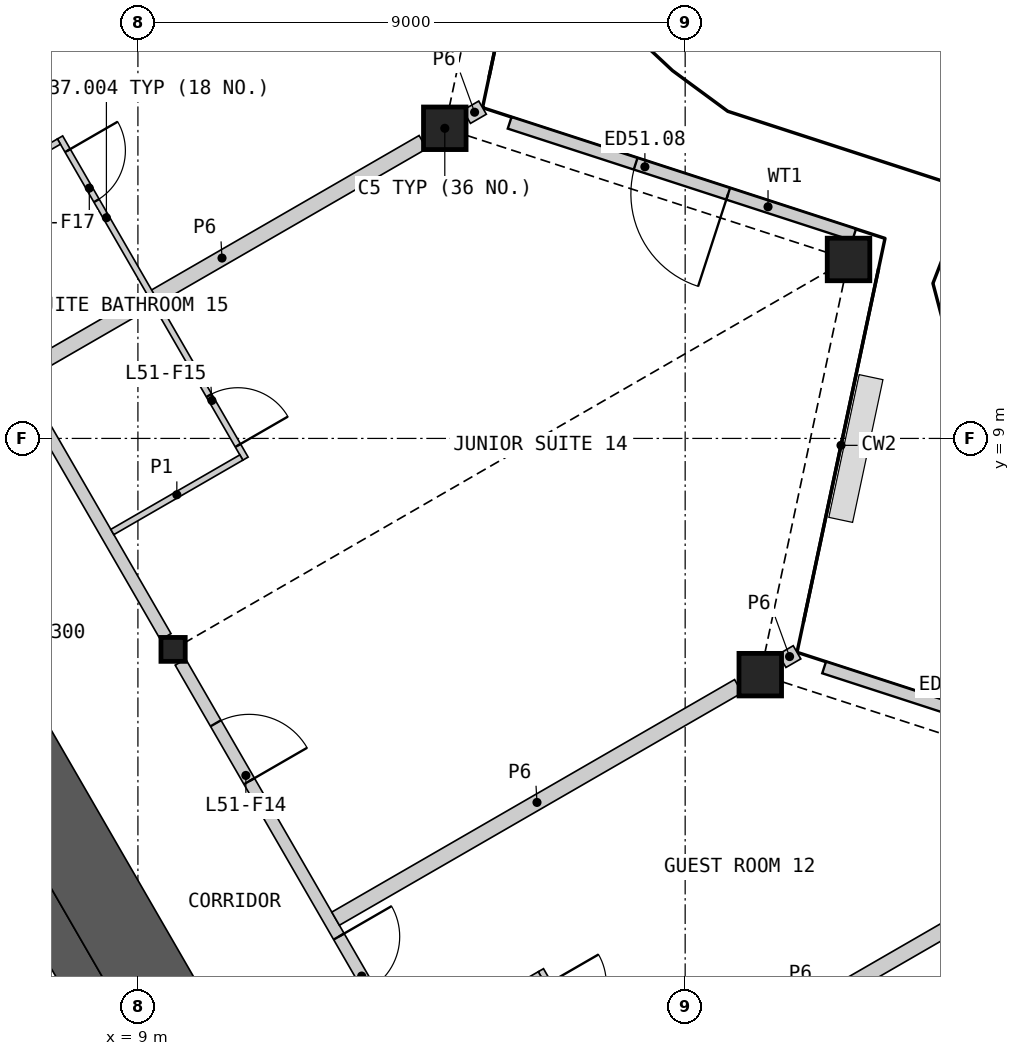
"""IFC4 building model, lengths in metres.
Left out: names, types, materials, properties, quantities, classifications, styles, units other than length and angle.
Written with IfcOpenShell. Run it as: python <this file> out.ifc"""

import sys

from ifc_helpers import new_model, si_unit, direction, frame, frame_2d, origin, origin_2d, place, context, subcontext, project, spatial, polyline, rectangle, hollow_rectangle, i_section, outline, extrude, element, fill, save


model = new_model("IFC4")
c1 = context("Model", 3, precision=1e-05, world=origin(), true_north=direction((0.0, 1.0)))
c2 = subcontext(c1, "Body", "Model", "MODEL_VIEW")
j1 = project(units=[si_unit("LENGTHUNIT", "METRE"), si_unit("PLANEANGLEUNIT", "RADIAN")], contexts=[c1])
p1 = place(None, origin())
s1 = spatial("IfcSite", under=j1, at=p1, CompositionType="ELEMENT")
p2 = place(p1, origin())
s2 = spatial("IfcBuilding", under=s1, at=p2, CompositionType="ELEMENT")
p3 = place(p2, frame((0.0, 0.0, 234.6)))
s3 = spatial("IfcBuildingStorey", under=s2, at=p3, CompositionType="ELEMENT", Elevation=234.6)
for number, where, z_axis, x_axis in (
    (1, (19.235, 5.115, 0.0), (0.0, 0.0, 1.0), (1.0, 0.0, 0.0)),
    (2, (20.687, 11.943, 0.0), (0.0, 0.0, 1.0), (1.0, 0.0, 0.0)),
    (3, (14.047, 14.101, 0.0), (0.0, 0.0, 1.0), (1.0, 0.0, 0.0)),
):
    element("IfcColumn", number, at=place(p3, frame(where, z_axis=z_axis, x_axis=x_axis)), inside=s3, PredefinedType="COLUMN", context=c2, shape_type="SweptSolid", body=[
        extrude(hollow_rectangle(XDim=0.7, YDim=0.7, WallThickness=0.045, at=origin_2d()), origin(), (0.0, 0.0, 1.0), 3.6),
    ])
p4 = place(p3, frame((9.578, 5.53, 0.0), z_axis=(0.0, 0.0, 1.0), x_axis=(1.0, 0.0, 0.0)))
e4 = element("IfcColumn", 4, at=p4, inside=s3, PredefinedType="COLUMN", context=c2, shape_type="SweptSolid", body=[
    extrude(i_section(OverallWidth=0.399, OverallDepth=0.393, WebThickness=0.023, FlangeThickness=0.037, at=origin_2d()), origin(), (0.0, 0.0, 1.0), 3.6),
])
p5 = place(p3, frame((25.977, 3.383, 0.0), z_axis=(0.0, 0.0, 1.0), x_axis=(-0.951062846307, 0.308997511922, 0.0)))
e5 = element("IfcWall", 5, at=p5, inside=s3, PredefinedType="SOLIDWALL", context=c2, shape_type="SweptSolid", body=[
    extrude(rectangle(XDim=5.984, YDim=0.2, at=frame_2d((2.992, 0.0))), origin(), (0.0, 0.0, 1.0), 2.701),
])
p6 = place(p5, frame((2.206, 0.0, 0.0)))
e6 = element("IfcOpeningElement", 6, at=p6, cuts=e5, PredefinedType="OPENING", context=c2, shape_type="SweptSolid", body=[
    extrude(rectangle(XDim=1.6, YDim=2.4, at=frame_2d((0.8, 1.2))), frame((0.0, 0.11, 0.0), z_axis=(0.0, -1.0, 0.0), x_axis=(1.0, 0.0, 0.0)), (0.0, 0.0, 1.0), 0.22),
])
p7 = place(p3, frame((20.779, 12.35, 0.0), z_axis=(0.0, 0.0, 1.0), x_axis=(-0.951065383831, 0.308989701572, 0.0)))
e7 = element("IfcWall", 7, at=p7, inside=s3, PredefinedType="SOLIDWALL", context=c2, shape_type="SweptSolid", body=[
    extrude(rectangle(XDim=5.958, YDim=0.2, at=frame_2d((2.979, 0.0))), origin(), (0.0, 0.0, 1.0), 2.701),
])
p8 = place(p7, frame((2.179, 0.0, 0.0)))
e8 = element("IfcOpeningElement", 8, at=p8, cuts=e7, PredefinedType="OPENING", context=c2, shape_type="SweptSolid", body=[
    extrude(rectangle(XDim=1.6, YDim=2.4, at=frame_2d((0.8, 1.2))), frame((0.0, 0.11, 0.0), z_axis=(0.0, -1.0, 0.0), x_axis=(1.0, 0.0, 0.0)), (0.0, 0.0, 1.0), 0.22),
])
p9 = place(p3, origin())
e9 = element("IfcWall", 9, at=p9, inside=s3, PredefinedType="SHEAR", context=c2, shape_type="SweptSolid", body=[
    extrude(outline(polyline([(6.324, 3.767), (8.624, -0.217), (8.231, -0.444), (6.061, -1.697), (5.96, -1.524), (7.952, -0.374), (5.852, 3.263), (3.861, 2.113), (3.76, 2.287), (5.931, 3.54), (6.324, 3.767)])), origin(), (0.0, 0.0, 1.0), 3.25),
])
p10 = place(p3, frame((10.081, -1.441, 0.0), z_axis=(0.0, 0.0, 1.0), x_axis=(-0.500012180433, 0.866018371294, 0.0)))
e10 = element("IfcWall", 10, at=p10, inside=s3, PredefinedType="SHEAR", context=c2, shape_type="SweptSolid", body=[
    extrude(rectangle(XDim=15.05, YDim=1.3, at=frame_2d((7.525, 0.0))), origin(), (0.0, 0.0, 1.0), 3.25),
])
p11 = place(p3, frame((14.837, -3.378, 0.0), z_axis=(0.0, 0.0, 1.0), x_axis=(0.866021706022, 0.500006404657, 0.0)))
e11 = element("IfcWall", 11, at=p11, inside=s3, PredefinedType="PARTITIONING", context=c2, shape_type="SweptSolid", body=[
    extrude(rectangle(XDim=12.33, YDim=0.25, at=frame_2d((6.165, 0.0))), origin(), (0.0, 0.0, 1.0), 2.404),
])
p12 = place(p3, frame((9.699, 5.321, 0.0), z_axis=(0.0, 0.0, 1.0), x_axis=(0.49998193945, -0.866035830797, 0.0)))
e12 = element("IfcWall", 12, at=p12, inside=s3, PredefinedType="PARTITIONING", context=c2, shape_type="SweptSolid", body=[
    extrude(rectangle(XDim=9.094, YDim=0.2, at=frame_2d((4.547, 0.0))), origin(), (0.0, 0.0, 1.0), 3.25),
])
p13 = place(p12, frame((5.212, 0.0, 0.0)))
e13 = element("IfcOpeningElement", 13, at=p13, cuts=e12, PredefinedType="OPENING", context=c2, shape_type="SweptSolid", body=[
    extrude(rectangle(XDim=1.0, YDim=2.1, at=frame_2d((0.5, 1.05))), frame((0.0, 0.11, 0.0), z_axis=(0.0, -1.0, 0.0), x_axis=(1.0, 0.0, 0.0)), (0.0, 0.0, 1.0), 0.22),
])
p14 = place(p12, frame((1.162, 0.0, 0.0)))
e14 = element("IfcOpeningElement", 14, at=p14, cuts=e12, PredefinedType="OPENING", context=c2, shape_type="SweptSolid", body=[
    extrude(rectangle(XDim=1.1, YDim=2.1, at=frame_2d((0.55, 1.05))), frame((0.0, 0.11, 0.0), z_axis=(0.0, -1.0, 0.0), x_axis=(1.0, 0.0, 0.0)), (0.0, 0.0, 1.0), 0.22),
])
p15 = place(p3, frame((4.91, 13.616, 0.0), z_axis=(0.0, 0.0, 1.0), x_axis=(0.50000207303, -0.866024206917, 0.0)))
e15 = element("IfcWall", 15, at=p15, inside=s3, PredefinedType="PARTITIONING", context=c2, shape_type="SweptSolid", body=[
    extrude(rectangle(XDim=9.095, YDim=0.2, at=frame_2d((4.547, 0.0))), origin(), (0.0, 0.0, 1.0), 3.25),
])
p16 = place(p3, frame((12.251, 1.101, 0.0), z_axis=(0.0, 0.0, 1.0), x_axis=(0.866020808234, 0.500007959642, 0.0)))
e16 = element("IfcWall", 16, at=p16, inside=s3, PredefinedType="PARTITIONING", context=c2, shape_type="SweptSolid", body=[
    extrude(rectangle(XDim=7.649, YDim=0.25, at=frame_2d((3.824, 0.0))), origin(), (0.0, 0.0, 1.0), 2.404),
])
p17 = place(p3, frame((7.079, 10.059, 0.0), z_axis=(0.0, 0.0, 1.0), x_axis=(0.866033195618, 0.499986503906, 0.0)))
e17 = element("IfcWall", 17, at=p17, inside=s3, PredefinedType="PARTITIONING", context=c2, shape_type="SweptSolid", body=[
    extrude(rectangle(XDim=7.63, YDim=0.25, at=frame_2d((3.815, 0.0))), origin(), (0.0, 0.0, 1.0), 2.404),
])
p18 = place(p3, frame((14.407, 14.29, 0.0), z_axis=(0.0, 0.0, 1.0), x_axis=(0.865888485494, 0.500237074485, 0.0)))
e18 = element("IfcWall", 18, at=p18, inside=s3, PredefinedType="PARTITIONING", context=c2, shape_type="SweptSolid", body=[
    extrude(rectangle(XDim=0.301, YDim=0.25, at=frame_2d((0.15, 0.0))), origin(), (0.0, 0.0, 1.0), 2.404),
])
p19 = place(p3, frame((19.595, 5.341, 0.0), z_axis=(0.0, 0.0, 1.0), x_axis=(0.865998287773, 0.500046963369, 0.0)))
e19 = element("IfcWall", 19, at=p19, inside=s3, PredefinedType="PARTITIONING", context=c2, shape_type="SweptSolid", body=[
    extrude(rectangle(XDim=0.282, YDim=0.25, at=frame_2d((0.141, 0.0))), origin(), (0.0, 0.0, 1.0), 2.404),
])
p20 = place(p3, frame((7.719, 13.95, 0.0), z_axis=(0.0, 0.0, 1.0), x_axis=(0.500008851346, -0.866020293397, 0.0)))
e20 = element("IfcWall", 20, at=p20, inside=s3, PredefinedType="PARTITIONING", context=c2, shape_type="SweptSolid", body=[
    extrude(rectangle(XDim=6.1, YDim=0.1, at=frame_2d((3.05, 0.0))), origin(), (0.0, 0.0, 1.0), 2.404),
])
p21 = place(p20, frame((4.9, 0.0, 0.0)))
e21 = element("IfcOpeningElement", 21, at=p21, cuts=e20, PredefinedType="OPENING", context=c2, shape_type="SweptSolid", body=[
    extrude(rectangle(XDim=0.95, YDim=2.1, at=frame_2d((0.475, 1.05))), frame((0.0, 0.06, 0.0), z_axis=(0.0, -1.0, 0.0), x_axis=(1.0, 0.0, 0.0)), (0.0, 0.0, 1.0), 0.12),
])
p22 = place(p20, frame((0.25, 0.0, 0.0)))
e22 = element("IfcOpeningElement", 22, at=p22, cuts=e20, PredefinedType="OPENING", context=c2, shape_type="SweptSolid", body=[
    extrude(rectangle(XDim=0.95, YDim=2.1, at=frame_2d((0.475, 1.05))), frame((0.0, 0.06, 0.0), z_axis=(0.0, -1.0, 0.0), x_axis=(1.0, 0.0, 0.0)), (0.0, 0.0, 1.0), 0.12),
])
p23 = place(p3, frame((15.627, 0.254, 0.0), z_axis=(0.0, 0.0, 1.0), x_axis=(0.500027264788, -0.866009661879, 0.0)))
e23 = element("IfcWall", 23, at=p23, inside=s3, PredefinedType="PARTITIONING", context=c2, shape_type="SweptSolid", body=[
    extrude(rectangle(XDim=5.2, YDim=0.1, at=frame_2d((2.6, 0.0))), origin(), (0.0, 0.0, 1.0), 2.404),
])
p24 = place(p23, frame((4.0, 0.0, 0.0)))
e24 = element("IfcOpeningElement", 24, at=p24, cuts=e23, PredefinedType="OPENING", context=c2, shape_type="SweptSolid", body=[
    extrude(rectangle(XDim=0.95, YDim=2.1, at=frame_2d((0.475, 1.05))), frame((0.0, 0.06, 0.0), z_axis=(0.0, -1.0, 0.0), x_axis=(1.0, 0.0, 0.0)), (0.0, 0.0, 1.0), 0.12),
])
p25 = place(p23, frame((0.25, 0.0, 0.0)))
e25 = element("IfcOpeningElement", 25, at=p25, cuts=e23, PredefinedType="OPENING", context=c2, shape_type="SweptSolid", body=[
    extrude(rectangle(XDim=0.95, YDim=2.1, at=frame_2d((0.475, 1.05))), frame((0.0, 0.06, 0.0), z_axis=(0.0, -1.0, 0.0), x_axis=(1.0, 0.0, 0.0)), (0.0, 0.0, 1.0), 0.12),
])
p26 = place(p3, frame((13.487, -1.04, 0.0), z_axis=(0.0, 0.0, 1.0), x_axis=(0.866032905446, 0.499987006516, 0.0)))
e26 = element("IfcWall", 26, at=p26, inside=s3, PredefinedType="PARTITIONING", context=c2, shape_type="SweptSolid", body=[
    extrude(rectangle(XDim=2.45, YDim=0.1, at=frame_2d((1.225, 0.0))), origin(), (0.0, 0.0, 1.0), 2.404),
])
p27 = place(p3, frame((8.579, 7.461, 0.0), z_axis=(0.0, 0.0, 1.0), x_axis=(0.866014668023, 0.500018594424, 0.0)))
e27 = element("IfcWall", 27, at=p27, inside=s3, PredefinedType="PARTITIONING", context=c2, shape_type="SweptSolid", body=[
    extrude(rectangle(XDim=2.45, YDim=0.1, at=frame_2d((1.225, 0.0))), origin(), (0.0, 0.0, 1.0), 2.404),
])
p28 = place(p3, frame((5.579, 12.657, 0.0), z_axis=(0.0, 0.0, 1.0), x_axis=(0.866057815567, 0.499943856944, 0.0)))
e28 = element("IfcWall", 28, at=p28, inside=s3, PredefinedType="PARTITIONING", context=c2, shape_type="SweptSolid", body=[
    extrude(rectangle(XDim=2.45, YDim=0.1, at=frame_2d((1.225, 0.0))), origin(), (0.0, 0.0, 1.0), 2.404),
])
p29 = place(p8, origin())
e29 = element("IfcDoor", 29, at=p29, inside=s3, OperationType="DOUBLE_DOOR_SINGLE_SWING", PredefinedType="DOOR", context=c2, shape_type="SweptSolid", body=[
    extrude(rectangle(XDim=1.6, YDim=2.4, at=frame_2d((0.8, 1.2))), frame((0.0, 0.025, 0.0), z_axis=(0.0, -1.0, 0.0), x_axis=(1.0, 0.0, 0.0)), (0.0, 0.0, 1.0), 0.05),
])
fill(e8, e29)
p30 = place(p13, origin())
e30 = element("IfcDoor", 30, at=p30, inside=s3, OperationType="SINGLE_SWING_LEFT", PredefinedType="DOOR", context=c2, shape_type="SweptSolid", body=[
    extrude(rectangle(XDim=1.0, YDim=2.1, at=frame_2d((0.5, 1.05))), frame((0.0, 0.025, 0.0), z_axis=(0.0, -1.0, 0.0), x_axis=(1.0, 0.0, 0.0)), (0.0, 0.0, 1.0), 0.05),
])
fill(e13, e30)
p31 = place(p14, origin())
e31 = element("IfcDoor", 31, at=p31, inside=s3, OperationType="SINGLE_SWING_RIGHT", PredefinedType="DOOR", context=c2, shape_type="SweptSolid", body=[
    extrude(rectangle(XDim=1.1, YDim=2.1, at=frame_2d((0.55, 1.05))), frame((0.0, 0.025, 0.0), z_axis=(0.0, -1.0, 0.0), x_axis=(1.0, 0.0, 0.0)), (0.0, 0.0, 1.0), 0.05),
])
fill(e14, e31)
p32 = place(p21, origin())
e32 = element("IfcDoor", 32, at=p32, inside=s3, OperationType="SINGLE_SWING_RIGHT", PredefinedType="DOOR", context=c2, shape_type="SweptSolid", body=[
    extrude(rectangle(XDim=0.95, YDim=2.1, at=frame_2d((0.475, 1.05))), frame((0.0, 0.025, 0.0), z_axis=(0.0, -1.0, 0.0), x_axis=(1.0, 0.0, 0.0)), (0.0, 0.0, 1.0), 0.05),
])
fill(e21, e32)
p33 = place(p22, origin())
e33 = element("IfcDoor", 33, at=p33, inside=s3, OperationType="SINGLE_SWING_LEFT", PredefinedType="DOOR", context=c2, shape_type="SweptSolid", body=[
    extrude(rectangle(XDim=0.95, YDim=2.1, at=frame_2d((0.475, 1.05))), frame((0.0, 0.025, 0.0), z_axis=(0.0, -1.0, 0.0), x_axis=(1.0, 0.0, 0.0)), (0.0, 0.0, 1.0), 0.05),
])
fill(e22, e33)
save(model, sys.argv[1])
